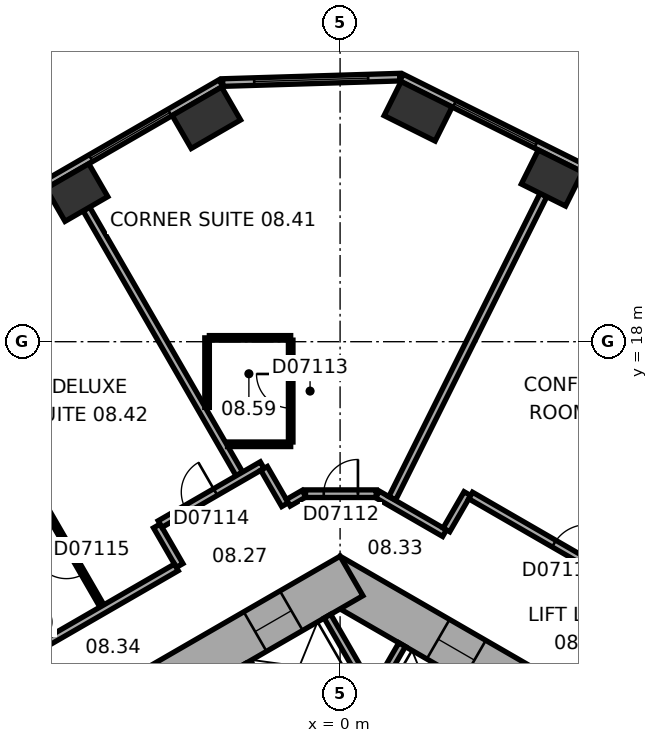
"""IFC4 building model, lengths in metres.
Left out: names, types, materials, properties, quantities, classifications, styles, units other than length and angle.
Written with IfcOpenShell. Run it as: python <this file> out.ifc"""

import sys

from ifc_helpers import new_model, si_unit, direction, frame, frame_2d, origin, origin_2d, place, context, subcontext, project, spatial, rectangle, extrude, element, fill, save


model = new_model("IFC4")
c1 = context("Model", 3, precision=1e-05, world=origin(), true_north=direction((0.0, 1.0)))
c2 = subcontext(c1, "Body", "Model", "MODEL_VIEW")
j1 = project(units=[si_unit("LENGTHUNIT", "METRE"), si_unit("PLANEANGLEUNIT", "RADIAN")], contexts=[c1])
p1 = place(None, origin())
s1 = spatial("IfcSite", under=j1, at=p1, CompositionType="ELEMENT")
p2 = place(p1, origin())
s2 = spatial("IfcBuilding", under=s1, at=p2, CompositionType="ELEMENT")
p3 = place(p2, frame((0.0, 0.0, 47.3)))
s3 = spatial("IfcBuildingStorey", under=s2, at=p3, CompositionType="ELEMENT", Elevation=47.3)
p4 = place(p3, frame((5.574, 22.306, 0.0), z_axis=(0.0, 0.0, 1.0), x_axis=(-0.894934361602, 0.44619781311, 0.0)))
e1 = element("IfcColumn", 1, at=p4, inside=s3, PredefinedType="COLUMN", context=c2, shape_type="SweptSolid", body=[
    extrude(rectangle(XDim=1.3, YDim=1.0, at=origin_2d()), origin(), (0.0, 0.0, 1.0), 3.3),
])
for number, where, z_axis, x_axis in (
    (2, (2.053, 24.062, 0.0), (0.0, 0.0, 1.0), (-0.895, 0.446, 0.0)),
    (3, (-3.518, 23.892, 0.0), (0.0, 0.0, 1.0), (-0.866, -0.5, 0.0)),
):
    element("IfcColumn", number, at=place(p3, frame(where, z_axis=z_axis, x_axis=x_axis)), inside=s3, PredefinedType="COLUMN", context=c2, shape_type="SweptSolid", body=[
        extrude(rectangle(XDim=1.5, YDim=1.0, at=origin_2d()), origin(), (0.0, 0.0, 1.0), 3.3),
    ])
p5 = place(p3, frame((-6.926, 21.925, 0.0), z_axis=(0.0, 0.0, 1.0), x_axis=(-0.866025403784, -0.5, 0.0)))
e4 = element("IfcColumn", 4, at=p5, inside=s3, PredefinedType="COLUMN", context=c2, shape_type="SweptSolid", body=[
    extrude(rectangle(XDim=1.3, YDim=1.0, at=origin_2d()), origin(), (0.0, 0.0, 1.0), 3.3),
])
p6 = place(p3, frame((10.4, 5.658, 0.0), z_axis=(0.0, 0.0, 1.0), x_axis=(-0.866021384402, 0.500006961711, 0.0)))
e5 = element("IfcWall", 5, at=p6, inside=s3, PredefinedType="SHEAR", context=c2, shape_type="SweptSolid", body=[
    extrude(rectangle(XDim=12.355, YDim=1.2, at=frame_2d((6.178, 0.0))), origin(), (0.0, 0.0, 1.0), 3.3),
])
p7 = place(p6, frame((2.728, 0.0, 0.0)))
e6 = element("IfcOpeningElement", 6, at=p7, cuts=e5, PredefinedType="OPENING", context=c2, shape_type="SweptSolid", body=[
    extrude(rectangle(XDim=1.1, YDim=2.1, at=frame_2d((0.55, 1.05))), frame((0.0, 0.61, 0.0), z_axis=(0.0, -1.0, 0.0), x_axis=(1.0, 0.0, 0.0)), (0.0, 0.0, 1.0), 1.22),
])
p8 = place(p6, frame((5.328, 0.0, 0.0)))
e7 = element("IfcOpeningElement", 7, at=p8, cuts=e5, PredefinedType="OPENING", context=c2, shape_type="SweptSolid", body=[
    extrude(rectangle(XDim=1.1, YDim=2.1, at=frame_2d((0.55, 1.05))), frame((0.0, 0.61, 0.0), z_axis=(0.0, -1.0, 0.0), x_axis=(1.0, 0.0, 0.0)), (0.0, 0.0, 1.0), 1.22),
])
p9 = place(p6, frame((7.928, 0.0, 0.0)))
e8 = element("IfcOpeningElement", 8, at=p9, cuts=e5, PredefinedType="OPENING", context=c2, shape_type="SweptSolid", body=[
    extrude(rectangle(XDim=1.1, YDim=2.1, at=frame_2d((0.55, 1.05))), frame((0.0, 0.61, 0.0), z_axis=(0.0, -1.0, 0.0), x_axis=(1.0, 0.0, 0.0)), (0.0, 0.0, 1.0), 1.22),
])
p10 = place(p3, frame((0.3, 11.836, 0.0), z_axis=(0.0, 0.0, 1.0), x_axis=(-0.866021384402, -0.500006961711, 0.0)))
e9 = element("IfcWall", 9, at=p10, inside=s3, PredefinedType="SHEAR", context=c2, shape_type="SweptSolid", body=[
    extrude(rectangle(XDim=12.355, YDim=1.2, at=frame_2d((6.178, 0.0))), origin(), (0.0, 0.0, 1.0), 3.3),
])
p11 = place(p10, frame((6.378, 0.0, 0.0)))
e10 = element("IfcOpeningElement", 10, at=p11, cuts=e9, PredefinedType="OPENING", context=c2, shape_type="SweptSolid", body=[
    extrude(rectangle(XDim=1.5, YDim=2.1, at=frame_2d((0.75, 1.05))), frame((0.0, 0.61, 0.0), z_axis=(0.0, -1.0, 0.0), x_axis=(1.0, 0.0, 0.0)), (0.0, 0.0, 1.0), 1.22),
])
p12 = place(p10, frame((1.828, 0.0, 0.0)))
e11 = element("IfcOpeningElement", 11, at=p12, cuts=e9, PredefinedType="OPENING", context=c2, shape_type="SweptSolid", body=[
    extrude(rectangle(XDim=1.1, YDim=2.1, at=frame_2d((0.55, 1.05))), frame((0.0, 0.61, 0.0), z_axis=(0.0, -1.0, 0.0), x_axis=(1.0, 0.0, 0.0)), (0.0, 0.0, 1.0), 1.22),
])
p13 = place(p3, frame((20.63, 15.47, 0.0), z_axis=(0.0, 0.0, 1.0), x_axis=(-0.894934518609, 0.446197498203, 0.0)))
e12 = element("IfcWall", 12, at=p13, inside=s3, PredefinedType="STANDARD", context=c2, shape_type="SweptSolid", body=[
    extrude(rectangle(XDim=21.246, YDim=0.2, at=frame_2d((10.623, 0.0))), origin(), (0.0, 0.0, 1.0), 3.3),
])
p14 = place(p13, frame((1.553, 0.0, 0.8)))
e13 = element("IfcOpeningElement", 13, at=p14, cuts=e12, PredefinedType="OPENING", context=c2, shape_type="SweptSolid", body=[
    extrude(rectangle(XDim=2.4, YDim=1.7, at=frame_2d((1.2, 0.85))), frame((0.0, 0.11, 0.0), z_axis=(0.0, -1.0, 0.0), x_axis=(1.0, 0.0, 0.0)), (0.0, 0.0, 1.0), 0.22),
])
p15 = place(p13, frame((5.488, 0.0, 0.8)))
e14 = element("IfcOpeningElement", 14, at=p15, cuts=e12, PredefinedType="OPENING", context=c2, shape_type="SweptSolid", body=[
    extrude(rectangle(XDim=2.4, YDim=1.7, at=frame_2d((1.2, 0.85))), frame((0.0, 0.11, 0.0), z_axis=(0.0, -1.0, 0.0), x_axis=(1.0, 0.0, 0.0)), (0.0, 0.0, 1.0), 0.22),
])
p16 = place(p13, frame((9.422, 0.0, 0.8)))
e15 = element("IfcOpeningElement", 15, at=p16, cuts=e12, PredefinedType="OPENING", context=c2, shape_type="SweptSolid", body=[
    extrude(rectangle(XDim=2.4, YDim=1.7, at=frame_2d((1.2, 0.85))), frame((0.0, 0.11, 0.0), z_axis=(0.0, -1.0, 0.0), x_axis=(1.0, 0.0, 0.0)), (0.0, 0.0, 1.0), 0.22),
])
p17 = place(p13, frame((13.357, 0.0, 0.8)))
e16 = element("IfcOpeningElement", 16, at=p17, cuts=e12, PredefinedType="OPENING", context=c2, shape_type="SweptSolid", body=[
    extrude(rectangle(XDim=2.4, YDim=1.7, at=frame_2d((1.2, 0.85))), frame((0.0, 0.11, 0.0), z_axis=(0.0, -1.0, 0.0), x_axis=(1.0, 0.0, 0.0)), (0.0, 0.0, 1.0), 0.22),
])
p18 = place(p13, frame((17.292, 0.0, 0.8)))
e17 = element("IfcOpeningElement", 17, at=p18, cuts=e12, PredefinedType="OPENING", context=c2, shape_type="SweptSolid", body=[
    extrude(rectangle(XDim=2.4, YDim=1.7, at=frame_2d((1.2, 0.85))), frame((0.0, 0.11, 0.0), z_axis=(0.0, -1.0, 0.0), x_axis=(1.0, 0.0, 0.0)), (0.0, 0.0, 1.0), 0.22),
])
p19 = place(p3, frame((1.568, 24.961, 0.0), z_axis=(0.0, 0.0, 1.0), x_axis=(-0.999533359013, -0.030546099927, 0.0)))
e18 = element("IfcWall", 18, at=p19, inside=s3, PredefinedType="STANDARD", context=c2, shape_type="SweptSolid", body=[
    extrude(rectangle(XDim=4.66, YDim=0.2, at=frame_2d((2.33, 0.0))), origin(), (0.0, 0.0, 1.0), 3.3),
])
p20 = place(p19, frame((0.83, 0.0, 0.8)))
e19 = element("IfcOpeningElement", 19, at=p20, cuts=e18, PredefinedType="OPENING", context=c2, shape_type="SweptSolid", body=[
    extrude(rectangle(XDim=3.0, YDim=1.7, at=frame_2d((1.5, 0.85))), frame((0.0, 0.11, 0.0), z_axis=(0.0, -1.0, 0.0), x_axis=(1.0, 0.0, 0.0)), (0.0, 0.0, 1.0), 0.22),
])
p21 = place(p3, frame((-3.136, 24.805, 0.0), z_axis=(0.0, 0.0, 1.0), x_axis=(-0.866028291626, -0.499994998079, 0.0)))
e20 = element("IfcWall", 20, at=p21, inside=s3, PredefinedType="STANDARD", context=c2, shape_type="SweptSolid", body=[
    extrude(rectangle(XDim=21.246, YDim=0.2, at=frame_2d((10.623, 0.0))), origin(), (0.0, 0.0, 1.0), 3.3),
])
p22 = place(p21, frame((1.555, 0.0, 0.8)))
e21 = element("IfcOpeningElement", 21, at=p22, cuts=e20, PredefinedType="OPENING", context=c2, shape_type="SweptSolid", body=[
    extrude(rectangle(XDim=2.4, YDim=1.7, at=frame_2d((1.2, 0.85))), frame((0.0, 0.11, 0.0), z_axis=(0.0, -1.0, 0.0), x_axis=(1.0, 0.0, 0.0)), (0.0, 0.0, 1.0), 0.22),
])
p23 = place(p21, frame((5.489, 0.0, 0.8)))
e22 = element("IfcOpeningElement", 22, at=p23, cuts=e20, PredefinedType="OPENING", context=c2, shape_type="SweptSolid", body=[
    extrude(rectangle(XDim=2.4, YDim=1.7, at=frame_2d((1.2, 0.85))), frame((0.0, 0.11, 0.0), z_axis=(0.0, -1.0, 0.0), x_axis=(1.0, 0.0, 0.0)), (0.0, 0.0, 1.0), 0.22),
])
p24 = place(p21, frame((9.424, 0.0, 0.8)))
e23 = element("IfcOpeningElement", 23, at=p24, cuts=e20, PredefinedType="OPENING", context=c2, shape_type="SweptSolid", body=[
    extrude(rectangle(XDim=2.4, YDim=1.7, at=frame_2d((1.2, 0.85))), frame((0.0, 0.11, 0.0), z_axis=(0.0, -1.0, 0.0), x_axis=(1.0, 0.0, 0.0)), (0.0, 0.0, 1.0), 0.22),
])
p25 = place(p21, frame((13.358, 0.0, 0.8)))
e24 = element("IfcOpeningElement", 24, at=p25, cuts=e20, PredefinedType="OPENING", context=c2, shape_type="SweptSolid", body=[
    extrude(rectangle(XDim=2.4, YDim=1.7, at=frame_2d((1.2, 0.85))), frame((0.0, 0.11, 0.0), z_axis=(0.0, -1.0, 0.0), x_axis=(1.0, 0.0, 0.0)), (0.0, 0.0, 1.0), 0.22),
])
p26 = place(p21, frame((17.293, 0.0, 0.8)))
e25 = element("IfcOpeningElement", 25, at=p26, cuts=e20, PredefinedType="OPENING", context=c2, shape_type="SweptSolid", body=[
    extrude(rectangle(XDim=2.4, YDim=1.7, at=frame_2d((1.2, 0.85))), frame((0.0, 0.11, 0.0), z_axis=(0.0, -1.0, 0.0), x_axis=(1.0, 0.0, 0.0)), (0.0, 0.0, 1.0), 0.22),
])
p27 = place(p3, frame((0.532, 8.122, 0.0), z_axis=(0.0, 0.0, 1.0), x_axis=(0.500077893725, 0.86598042715, 0.0)))
e26 = element("IfcWall", 26, at=p27, inside=s3, PredefinedType="PARTITIONING", context=c2, shape_type="SweptSolid", body=[
    extrude(rectangle(XDim=2.2, YDim=0.2, at=frame_2d((1.1, 0.0))), origin(), (0.0, 0.0, 1.0), 3.05),
])
p28 = place(p3, frame((0.767, 8.872, 0.0), z_axis=(0.0, 0.0, 1.0), x_axis=(-0.499994660107, 0.866028486751, 0.0)))
e27 = element("IfcWall", 27, at=p28, inside=s3, PredefinedType="PARTITIONING", context=c2, shape_type="SweptSolid", body=[
    extrude(rectangle(XDim=2.2, YDim=0.2, at=frame_2d((1.1, 0.0))), origin(), (0.0, 0.0, 1.0), 3.05),
])
p29 = place(p3, frame((-1.485, 7.572, 0.0), z_axis=(0.0, 0.0, 1.0), x_axis=(-0.50002983664, 0.866008176907, 0.0)))
e28 = element("IfcWall", 28, at=p29, inside=s3, PredefinedType="PARTITIONING", context=c2, shape_type="SweptSolid", body=[
    extrude(rectangle(XDim=2.2, YDim=0.2, at=frame_2d((1.1, 0.0))), origin(), (0.0, 0.0, 1.0), 3.05),
])
p30 = place(p3, frame((-7.687, 13.506, 0.0), z_axis=(0.0, 0.0, 1.0), x_axis=(0.499985389037, -0.866033839264, 0.0)))
e29 = element("IfcWall", 29, at=p30, inside=s3, PredefinedType="PARTITIONING", context=c2, shape_type="SweptSolid", body=[
    extrude(rectangle(XDim=2.84, YDim=0.12, at=frame_2d((1.42, 0.0))), origin(), (0.0, 0.0, 1.0), 2.6),
])
p31 = place(p30, frame((0.97, 0.0, 0.0)))
e30 = element("IfcOpeningElement", 30, at=p31, cuts=e29, PredefinedType="OPENING", context=c2, shape_type="SweptSolid", body=[
    extrude(rectangle(XDim=0.9, YDim=2.1, at=frame_2d((0.45, 1.05))), frame((0.0, 0.07, 0.0), z_axis=(0.0, -1.0, 0.0), x_axis=(1.0, 0.0, 0.0)), (0.0, 0.0, 1.0), 0.14),
])
p32 = place(p3, frame((-6.676, 21.492, 0.0), z_axis=(0.0, 0.0, 1.0), x_axis=(0.500011263043, -0.866018900966, 0.0)))
e31 = element("IfcWall", 31, at=p32, inside=s3, PredefinedType="PARTITIONING", context=c2, shape_type="SweptSolid", body=[
    extrude(rectangle(XDim=8.049, YDim=0.2, at=frame_2d((4.024, 0.0))), origin(), (0.0, 0.0, 1.0), 3.05),
])
p33 = place(p3, frame((-4.823, 13.152, 0.0), z_axis=(0.0, 0.0, 1.0), x_axis=(0.499986357472, -0.866033280158, 0.0)))
e32 = element("IfcWall", 32, at=p33, inside=s3, PredefinedType="PARTITIONING", context=c2, shape_type="SweptSolid", body=[
    extrude(rectangle(XDim=1.201, YDim=0.2, at=frame_2d((0.601, 0.0))), origin(), (0.0, 0.0, 1.0), 3.05),
])
p34 = place(p3, frame((-4.309, 12.061, 0.0), z_axis=(0.0, 0.0, 1.0), x_axis=(-0.866020679205, -0.500008183122, 0.0)))
e33 = element("IfcWall", 33, at=p34, inside=s3, PredefinedType="PARTITIONING", context=c2, shape_type="SweptSolid", body=[
    extrude(rectangle(XDim=5.104, YDim=0.2, at=frame_2d((2.552, 0.0))), origin(), (0.0, 0.0, 1.0), 3.05),
])
p35 = place(p3, frame((-3.5, 16.271, 0.0), z_axis=(0.0, 0.0, 1.0), x_axis=(0.0, 1.0, 0.0)))
e34 = element("IfcWall", 34, at=p35, inside=s3, PredefinedType="PARTITIONING", context=c2, shape_type="SweptSolid", body=[
    extrude(rectangle(XDim=1.829, YDim=0.12, at=frame_2d((0.915, 0.0))), origin(), (0.0, 0.0, 1.0), 3.05),
])
p36 = place(p3, frame((-3.44, 18.101, 0.0), z_axis=(0.0, 0.0, 1.0), x_axis=(1.0, 0.0, 0.0)))
e35 = element("IfcWall", 35, at=p36, inside=s3, PredefinedType="PARTITIONING", context=c2, shape_type="SweptSolid", body=[
    extrude(rectangle(XDim=2.14, YDim=0.12, at=frame_2d((1.07, 0.0))), origin(), (0.0, 0.0, 1.0), 3.05),
])
p37 = place(p3, frame((-2.05, 14.752, 0.0), z_axis=(0.0, 0.0, 1.0), x_axis=(-0.866030936828, -0.499990416364, 0.0)))
e36 = element("IfcWall", 36, at=p37, inside=s3, PredefinedType="PARTITIONING", context=c2, shape_type="SweptSolid", body=[
    extrude(rectangle(XDim=3.102, YDim=0.2, at=frame_2d((1.551, 0.0))), origin(), (0.0, 0.0, 1.0), 3.05),
])
p38 = place(p37, frame((1.419, 0.0, 0.0)))
e37 = element("IfcOpeningElement", 37, at=p38, cuts=e36, PredefinedType="OPENING", context=c2, shape_type="SweptSolid", body=[
    extrude(rectangle(XDim=0.9, YDim=2.1, at=frame_2d((0.45, 1.05))), frame((0.0, 0.11, 0.0), z_axis=(0.0, -1.0, 0.0), x_axis=(1.0, 0.0, 0.0)), (0.0, 0.0, 1.0), 0.22),
])
p39 = place(p3, frame((-1.449, 13.712, 0.0), z_axis=(0.0, 0.0, 1.0), x_axis=(-0.499978356969, 0.866037899034, 0.0)))
e38 = element("IfcWall", 38, at=p39, inside=s3, PredefinedType="PARTITIONING", context=c2, shape_type="SweptSolid", body=[
    extrude(rectangle(XDim=1.101, YDim=0.2, at=frame_2d((0.551, 0.0))), origin(), (0.0, 0.0, 1.0), 3.05),
])
p40 = place(p3, frame((-1.3, 15.301, 0.0), z_axis=(0.0, 0.0, 1.0), x_axis=(-1.0, 0.0, 0.0)))
e39 = element("IfcWall", 39, at=p40, inside=s3, PredefinedType="PARTITIONING", context=c2, shape_type="SweptSolid", body=[
    extrude(rectangle(XDim=1.661, YDim=0.12, at=frame_2d((0.831, 0.0))), origin(), (0.0, 0.0, 1.0), 3.05),
])
p41 = place(p3, frame((-1.3, 18.041, 0.0), z_axis=(0.0, 0.0, 1.0), x_axis=(0.0, -1.0, 0.0)))
e40 = element("IfcWall", 40, at=p41, inside=s3, PredefinedType="PARTITIONING", context=c2, shape_type="SweptSolid", body=[
    extrude(rectangle(XDim=2.68, YDim=0.12, at=frame_2d((1.34, 0.0))), origin(), (0.0, 0.0, 1.0), 3.05),
])
p42 = place(p41, frame((0.89, 0.0, 0.0)))
e41 = element("IfcOpeningElement", 41, at=p42, cuts=e40, PredefinedType="OPENING", context=c2, shape_type="SweptSolid", body=[
    extrude(rectangle(XDim=0.9, YDim=2.1, at=frame_2d((0.45, 1.05))), frame((0.0, 0.07, 0.0), z_axis=(0.0, -1.0, 0.0), x_axis=(1.0, 0.0, 0.0)), (0.0, 0.0, 1.0), 0.14),
])
p43 = place(p3, frame((-0.95, 14.001, 0.0), z_axis=(0.0, 0.0, 1.0), x_axis=(-0.86609177584, -0.499885022602, 0.0)))
e42 = element("IfcWall", 42, at=p43, inside=s3, PredefinedType="PARTITIONING", context=c2, shape_type="SweptSolid", body=[
    extrude(rectangle(XDim=0.477, YDim=0.2, at=frame_2d((0.238, 0.0))), origin(), (0.0, 0.0, 1.0), 3.05),
])
p44 = place(p3, frame((0.95, 14.001, 0.0), z_axis=(0.0, 0.0, 1.0), x_axis=(-1.0, 0.0, 0.0)))
e43 = element("IfcWall", 43, at=p44, inside=s3, PredefinedType="PARTITIONING", context=c2, shape_type="SweptSolid", body=[
    extrude(rectangle(XDim=1.86, YDim=0.2, at=frame_2d((0.93, 0.0))), origin(), (0.0, 0.0, 1.0), 3.05),
])
p45 = place(p44, frame((0.48, 0.0, 0.0)))
e44 = element("IfcOpeningElement", 44, at=p45, cuts=e43, PredefinedType="OPENING", context=c2, shape_type="SweptSolid", body=[
    extrude(rectangle(XDim=0.9, YDim=2.1, at=frame_2d((0.45, 1.05))), frame((0.0, 0.11, 0.0), z_axis=(0.0, -1.0, 0.0), x_axis=(1.0, 0.0, 0.0)), (0.0, 0.0, 1.0), 0.22),
])
p46 = place(p3, frame((2.748, 12.962, 0.0), z_axis=(0.0, 0.0, 1.0), x_axis=(-0.866013897511, 0.50001992892, 0.0)))
e45 = element("IfcWall", 45, at=p46, inside=s3, PredefinedType="PARTITIONING", context=c2, shape_type="SweptSolid", body=[
    extrude(rectangle(XDim=2.037, YDim=0.2, at=frame_2d((1.018, 0.0))), origin(), (0.0, 0.0, 1.0), 3.05),
])
p47 = place(p3, frame((3.349, 14.002, 0.0), z_axis=(0.0, 0.0, 1.0), x_axis=(-0.500074377092, -0.865982457891, 0.0)))
e46 = element("IfcWall", 46, at=p47, inside=s3, PredefinedType="PARTITIONING", context=c2, shape_type="SweptSolid", body=[
    extrude(rectangle(XDim=1.101, YDim=0.2, at=frame_2d((0.55, 0.0))), origin(), (0.0, 0.0, 1.0), 3.05),
])
p48 = place(p3, frame((5.351, 21.859, 0.0), z_axis=(0.0, 0.0, 1.0), x_axis=(-0.446205309328, -0.894930624086, 0.0)))
e47 = element("IfcWall", 47, at=p48, inside=s3, PredefinedType="PARTITIONING", context=c2, shape_type="SweptSolid", body=[
    extrude(rectangle(XDim=8.913, YDim=0.2, at=frame_2d((4.457, 0.0))), origin(), (0.0, 0.0, 1.0), 2.6),
])
p49 = place(p3, frame((10.885, 9.652, 0.0), z_axis=(0.0, 0.0, 1.0), x_axis=(-0.866033868542, 0.499985338323, 0.0)))
e48 = element("IfcWall", 48, at=p49, inside=s3, PredefinedType="PARTITIONING", context=c2, shape_type="SweptSolid", body=[
    extrude(rectangle(XDim=8.602, YDim=0.2, at=frame_2d((4.301, 0.0))), origin(), (0.0, 0.0, 1.0), 3.05),
])
p50 = place(p49, frame((5.069, 0.0, 0.0)))
e49 = element("IfcOpeningElement", 49, at=p50, cuts=e48, PredefinedType="OPENING", context=c2, shape_type="SweptSolid", body=[
    extrude(rectangle(XDim=1.0, YDim=2.1, at=frame_2d((0.5, 1.05))), frame((0.0, 0.11, 0.0), z_axis=(0.0, -1.0, 0.0), x_axis=(1.0, 0.0, 0.0)), (0.0, 0.0, 1.0), 0.22),
])
p51 = place(p18, origin())
e50 = element("IfcWindow", 50, at=p51, inside=s3, PartitioningType="SINGLE_PANEL", PredefinedType="WINDOW", context=c2, shape_type="SweptSolid", body=[
    extrude(rectangle(XDim=2.4, YDim=1.7, at=frame_2d((1.2, 0.85))), frame((0.0, 0.03, 0.0), z_axis=(0.0, -1.0, 0.0), x_axis=(1.0, 0.0, 0.0)), (0.0, 0.0, 1.0), 0.06),
])
fill(e17, e50)
p52 = place(p20, origin())
e51 = element("IfcWindow", 51, at=p52, inside=s3, PartitioningType="SINGLE_PANEL", PredefinedType="WINDOW", context=c2, shape_type="SweptSolid", body=[
    extrude(rectangle(XDim=3.0, YDim=1.7, at=frame_2d((1.5, 0.85))), frame((0.0, 0.03, 0.0), z_axis=(0.0, -1.0, 0.0), x_axis=(1.0, 0.0, 0.0)), (0.0, 0.0, 1.0), 0.06),
])
fill(e19, e51)
p53 = place(p22, origin())
e52 = element("IfcWindow", 52, at=p53, inside=s3, PartitioningType="SINGLE_PANEL", PredefinedType="WINDOW", context=c2, shape_type="SweptSolid", body=[
    extrude(rectangle(XDim=2.4, YDim=1.7, at=frame_2d((1.2, 0.85))), frame((0.0, 0.03, 0.0), z_axis=(0.0, -1.0, 0.0), x_axis=(1.0, 0.0, 0.0)), (0.0, 0.0, 1.0), 0.06),
])
fill(e21, e52)
p54 = place(p9, origin())
e53 = element("IfcDoor", 53, at=p54, inside=s3, OperationType="DOUBLE_DOOR_SLIDING", PredefinedType="DOOR", context=c2, shape_type="SweptSolid", body=[
    extrude(rectangle(XDim=1.1, YDim=2.1, at=frame_2d((0.55, 1.05))), frame((0.0, 0.025, 0.0), z_axis=(0.0, -1.0, 0.0), x_axis=(1.0, 0.0, 0.0)), (0.0, 0.0, 1.0), 0.05),
])
fill(e8, e53)
p55 = place(p12, origin())
e54 = element("IfcDoor", 54, at=p55, inside=s3, OperationType="DOUBLE_DOOR_SLIDING", PredefinedType="DOOR", context=c2, shape_type="SweptSolid", body=[
    extrude(rectangle(XDim=1.1, YDim=2.1, at=frame_2d((0.55, 1.05))), frame((0.0, 0.025, 0.0), z_axis=(0.0, -1.0, 0.0), x_axis=(1.0, 0.0, 0.0)), (0.0, 0.0, 1.0), 0.05),
])
fill(e11, e54)
p56 = place(p50, origin())
e55 = element("IfcDoor", 55, at=p56, inside=s3, OperationType="SINGLE_SWING_LEFT", PredefinedType="DOOR", context=c2, shape_type="SweptSolid", body=[
    extrude(rectangle(XDim=1.0, YDim=2.1, at=frame_2d((0.5, 1.05))), frame((0.0, 0.025, 0.0), z_axis=(0.0, -1.0, 0.0), x_axis=(1.0, 0.0, 0.0)), (0.0, 0.0, 1.0), 0.05),
])
fill(e49, e55)
p57 = place(p45, origin())
e56 = element("IfcDoor", 56, at=p57, inside=s3, OperationType="SINGLE_SWING_LEFT", PredefinedType="DOOR", context=c2, shape_type="SweptSolid", body=[
    extrude(rectangle(XDim=0.9, YDim=2.1, at=frame_2d((0.45, 1.05))), frame((0.0, 0.025, 0.0), z_axis=(0.0, -1.0, 0.0), x_axis=(1.0, 0.0, 0.0)), (0.0, 0.0, 1.0), 0.05),
])
fill(e44, e56)
p58 = place(p42, origin())
e57 = element("IfcDoor", 57, at=p58, inside=s3, OperationType="SINGLE_SWING_LEFT", PredefinedType="DOOR", context=c2, shape_type="SweptSolid", body=[
    extrude(rectangle(XDim=0.9, YDim=2.1, at=frame_2d((0.45, 1.05))), frame((0.0, 0.025, 0.0), z_axis=(0.0, -1.0, 0.0), x_axis=(1.0, 0.0, 0.0)), (0.0, 0.0, 1.0), 0.05),
])
fill(e41, e57)
p59 = place(p38, origin())
e58 = element("IfcDoor", 58, at=p59, inside=s3, OperationType="SINGLE_SWING_LEFT", PredefinedType="DOOR", context=c2, shape_type="SweptSolid", body=[
    extrude(rectangle(XDim=0.9, YDim=2.1, at=frame_2d((0.45, 1.05))), frame((0.0, 0.025, 0.0), z_axis=(0.0, -1.0, 0.0), x_axis=(1.0, 0.0, 0.0)), (0.0, 0.0, 1.0), 0.05),
])
fill(e37, e58)
p60 = place(p31, origin())
e59 = element("IfcDoor", 59, at=p60, inside=s3, OperationType="SINGLE_SWING_LEFT", PredefinedType="DOOR", context=c2, shape_type="SweptSolid", body=[
    extrude(rectangle(XDim=0.9, YDim=2.1, at=frame_2d((0.45, 1.05))), frame((0.0, 0.025, 0.0), z_axis=(0.0, -1.0, 0.0), x_axis=(1.0, 0.0, 0.0)), (0.0, 0.0, 1.0), 0.05),
])
fill(e30, e59)
save(model, sys.argv[1])
